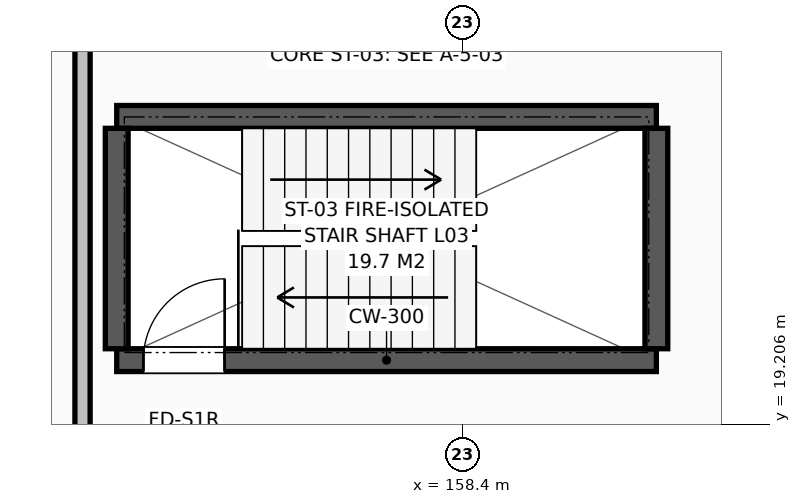
"""IFC4 building model, lengths in metres.
Left out: names, types, materials, properties, quantities, classifications, styles, units other than length and angle.
Written with IfcOpenShell. Run it as: python <this file> out.ifc"""

import sys

from ifc_helpers import new_model, si_unit, direction, frame, frame_2d, origin, place, context, subcontext, project, spatial, rectangle, extrude, element, fill, save


model = new_model("IFC4")
c1 = context("Model", 3, precision=1e-05, world=origin(), true_north=direction((0.0, 1.0)))
c2 = subcontext(c1, "Body", "Model", "MODEL_VIEW")
j1 = project(units=[si_unit("LENGTHUNIT", "METRE"), si_unit("PLANEANGLEUNIT", "RADIAN")], contexts=[c1])
p1 = place(None, origin())
s1 = spatial("IfcSite", under=j1, at=p1, CompositionType="ELEMENT")
p2 = place(p1, origin())
s2 = spatial("IfcBuilding", under=s1, at=p2, CompositionType="ELEMENT")
p3 = place(p2, frame((0.0, 0.0, 13.2)))
s3 = spatial("IfcBuildingStorey", under=s2, at=p3, CompositionType="ELEMENT", Elevation=13.2)
p4 = place(p3, frame((153.85, 20.05, 0.0), z_axis=(0.0, 0.0, 1.0), x_axis=(1.0, 0.0, 0.0)))
e1 = element("IfcWall", 1, at=p4, inside=s3, PredefinedType="SHEAR", context=c2, shape_type="SweptSolid", body=[
    extrude(rectangle(XDim=7.1, YDim=0.3, at=frame_2d((3.55, 0.0))), origin(), (0.0, 0.0, 1.0), 3.45),
])
p5 = place(p4, frame((0.35, 0.0, 0.0)))
e2 = element("IfcOpeningElement", 2, at=p5, cuts=e1, PredefinedType="OPENING", context=c2, shape_type="SweptSolid", body=[
    extrude(rectangle(XDim=1.07, YDim=2.15, at=frame_2d((0.535, 1.075))), frame((0.0, 0.16, 0.0), z_axis=(0.0, -1.0, 0.0), x_axis=(1.0, 0.0, 0.0)), (0.0, 0.0, 1.0), 0.32),
])
p6 = place(p3, frame((160.95, 23.25, 0.0), z_axis=(0.0, 0.0, 1.0), x_axis=(-1.0, 0.0, 0.0)))
e3 = element("IfcWall", 3, at=p6, inside=s3, PredefinedType="SHEAR", context=c2, shape_type="SweptSolid", body=[
    extrude(rectangle(XDim=7.1, YDim=0.3, at=frame_2d((3.55, 0.0))), origin(), (0.0, 0.0, 1.0), 3.45),
])
for number, where, z_axis, x_axis in (
    (4, (160.95, 20.2, 0.0), (0.0, 0.0, 1.0), (0.0, 1.0, 0.0)),
    (5, (153.85, 23.1, 0.0), (0.0, 0.0, 1.0), (0.0, -1.0, 0.0)),
):
    element("IfcWall", number, at=place(p3, frame(where, z_axis=z_axis, x_axis=x_axis)), inside=s3, PredefinedType="SHEAR", context=c2, shape_type="SweptSolid", body=[
        extrude(rectangle(XDim=2.9, YDim=0.3, at=frame_2d((1.45, 0.0))), origin(), (0.0, 0.0, 1.0), 3.45),
    ])
p7 = place(p3, frame((153.4, 18.4, 0.0), z_axis=(0.0, 0.0, 1.0), x_axis=(0.0, 1.0, 0.0)))
e6 = element("IfcWall", 6, at=p7, inside=s3, PredefinedType="SOLIDWALL", context=c2, shape_type="SweptSolid", body=[
    extrude(rectangle(XDim=12.95, YDim=0.2, at=frame_2d((6.475, 0.0))), origin(), (0.0, 0.0, 1.0), 3.6),
])
p8 = place(p5, origin())
e7 = element("IfcDoor", 7, at=p8, inside=s3, OperationType="SINGLE_SWING_RIGHT", PredefinedType="DOOR", context=c2, shape_type="SweptSolid", body=[
    extrude(rectangle(XDim=1.07, YDim=2.15, at=frame_2d((0.535, 1.075))), frame((0.0, 0.025, 0.0), z_axis=(0.0, -1.0, 0.0), x_axis=(1.0, 0.0, 0.0)), (0.0, 0.0, 1.0), 0.05),
])
fill(e2, e7)
save(model, sys.argv[1])
